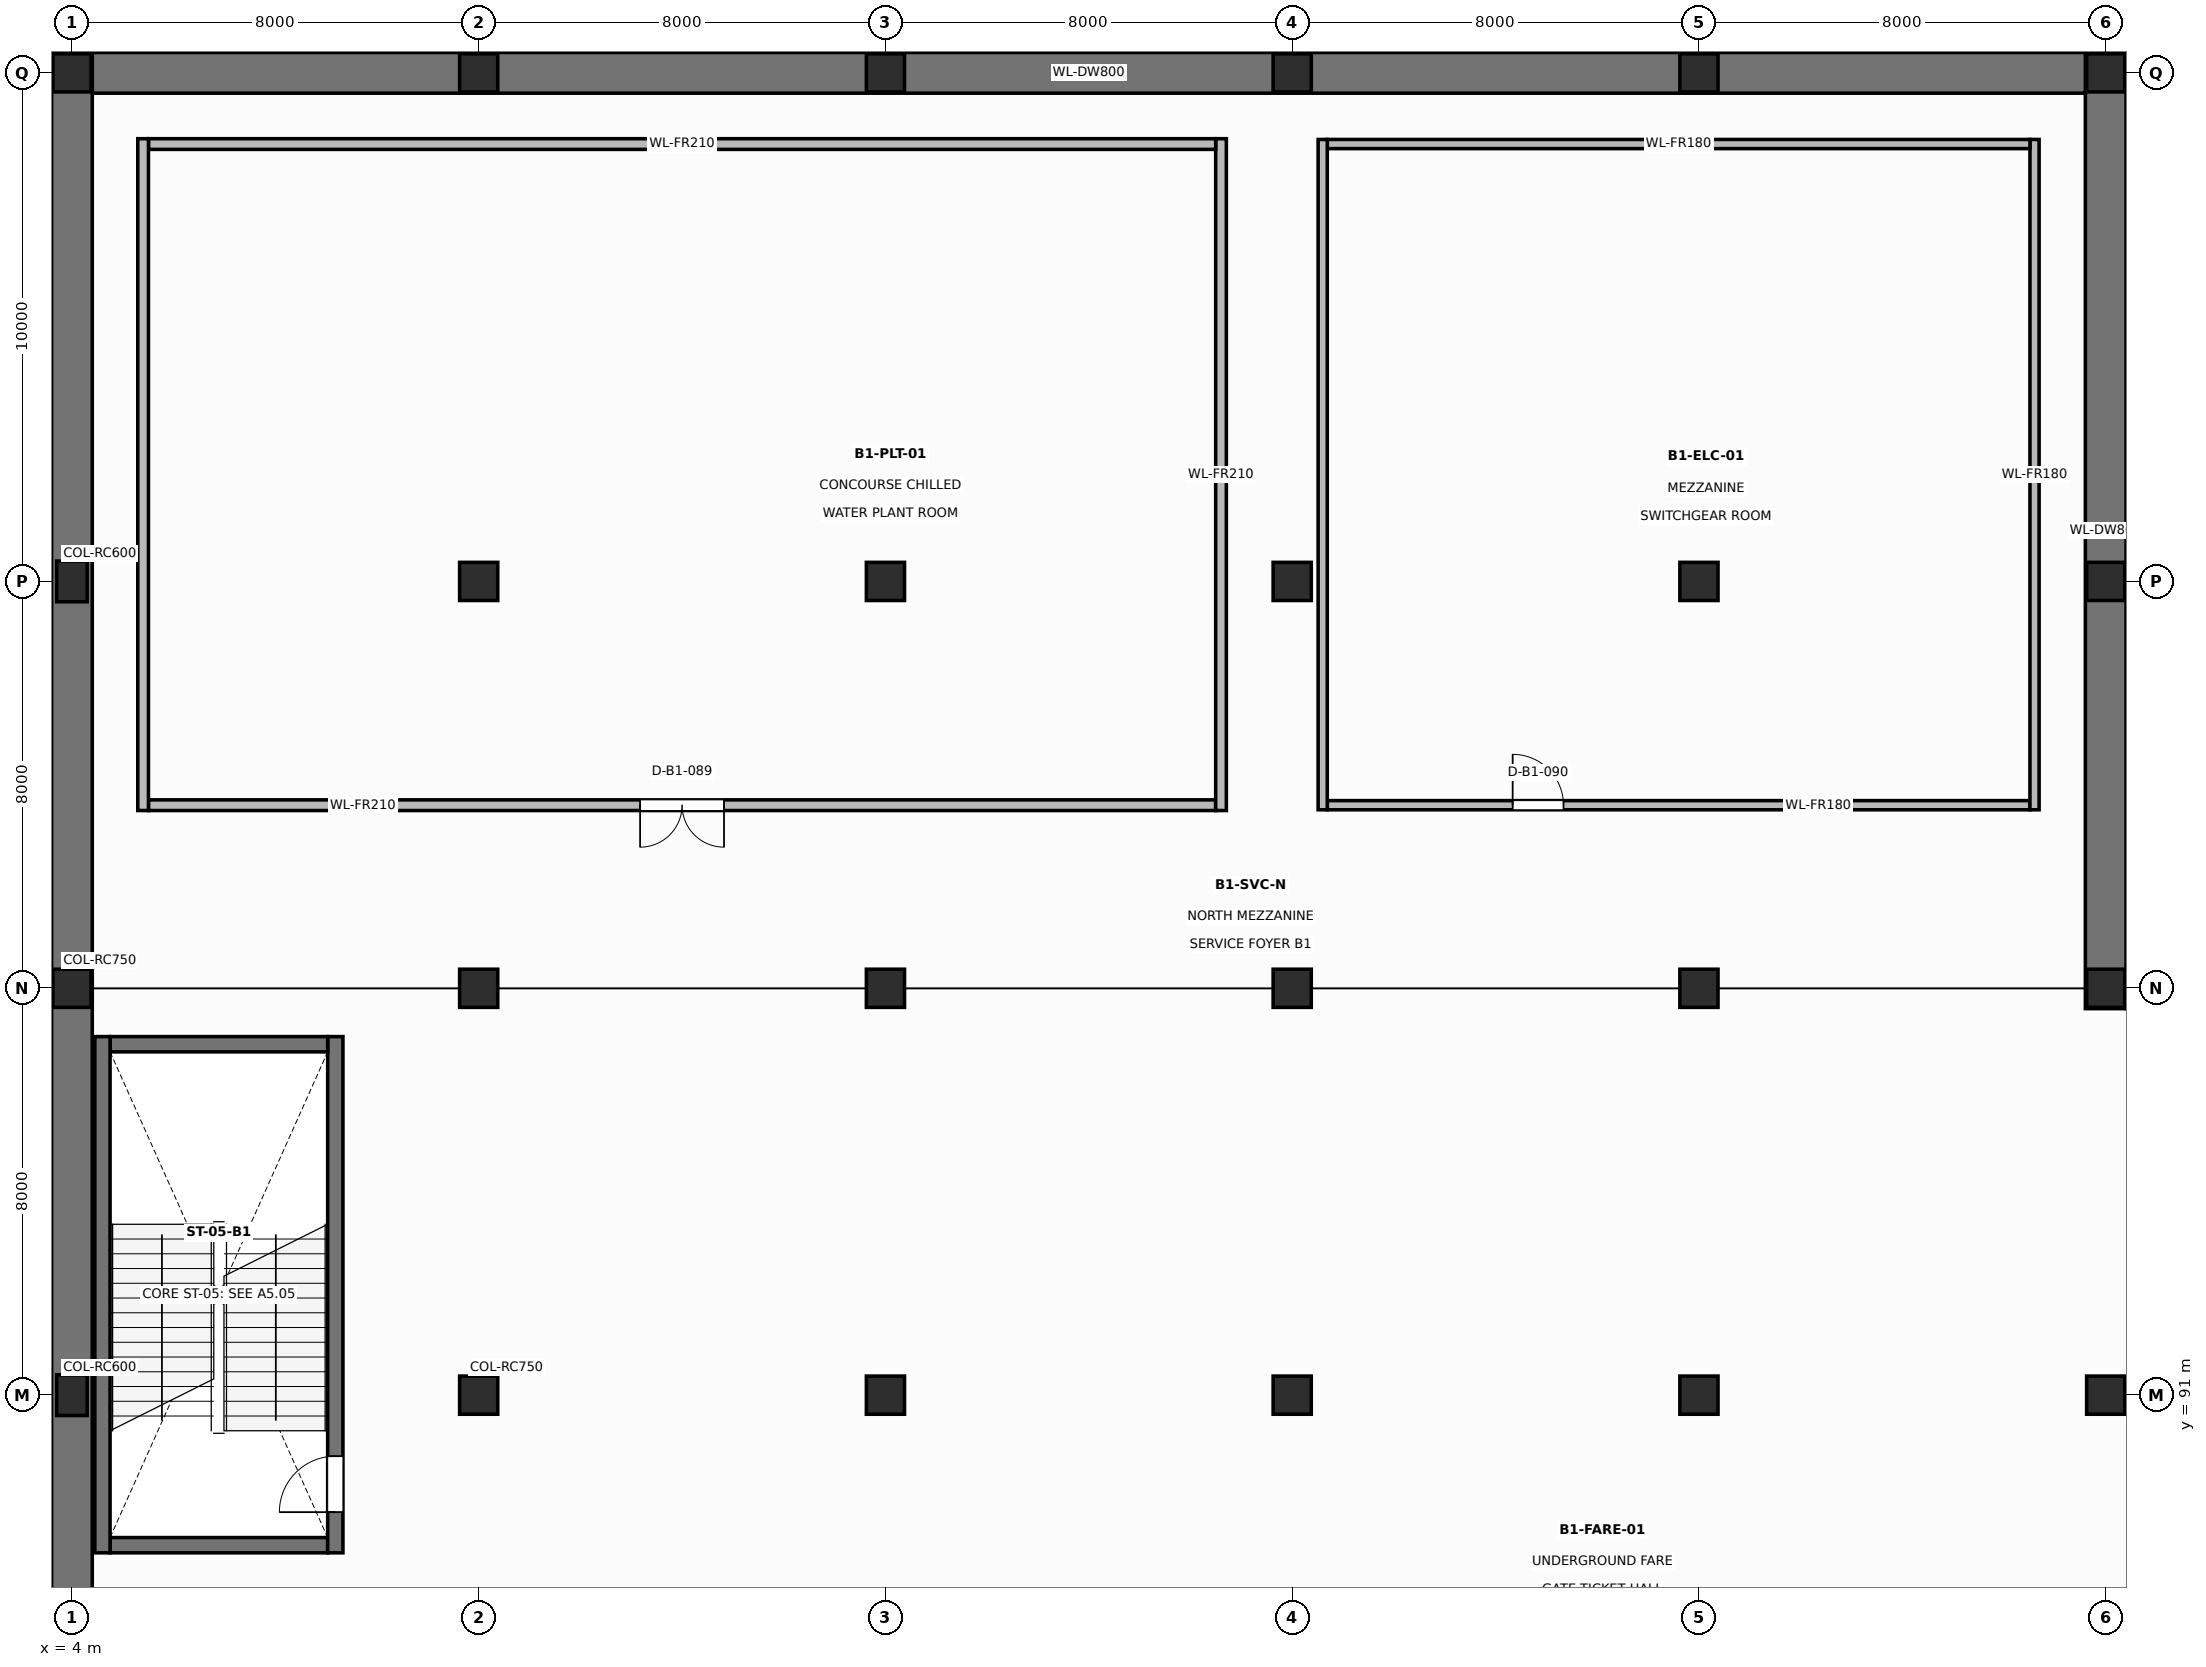
"""IFC4 building model, lengths in metres.
Left out: names, types, materials, properties, quantities, classifications, styles, units other than length and angle.
Written with IfcOpenShell. Run it as: python <this file> out.ifc"""

import sys

from ifc_helpers import new_model, si_unit, direction, frame, frame_2d, origin, origin_2d, place, context, subcontext, project, spatial, rectangle, extrude, element, fill, save


model = new_model("IFC4")
c1 = context("Model", 3, precision=1e-05, world=origin(), true_north=direction((0.0, 1.0)))
c2 = subcontext(c1, "Body", "Model", "MODEL_VIEW")
j1 = project(units=[si_unit("LENGTHUNIT", "METRE"), si_unit("PLANEANGLEUNIT", "RADIAN")], contexts=[c1])
p1 = place(None, origin())
s1 = spatial("IfcSite", under=j1, at=p1, CompositionType="ELEMENT")
p2 = place(p1, origin())
s2 = spatial("IfcBuilding", under=s1, at=p2, CompositionType="ELEMENT")
p3 = place(p2, frame((0.0, 0.0, -5.6)))
s3 = spatial("IfcBuildingStorey", under=s2, at=p3, CompositionType="ELEMENT", Elevation=-5.6)
p4 = place(p3, frame((44.0, 98.6, 0.0), z_axis=(0.0, 0.0, 1.0), x_axis=(0.0, 1.0, 0.0)))
e1 = element("IfcWall", 1, at=p4, inside=s3, PredefinedType="SOLIDWALL", context=c2, shape_type="SweptSolid", body=[
    extrude(rectangle(XDim=18.8, YDim=0.8, at=frame_2d((9.4, 0.0))), origin(), (0.0, 0.0, 1.0), 5.18),
])
p5 = place(p3, frame((4.4, 117.0, 0.0), z_axis=(0.0, 0.0, 1.0), x_axis=(1.0, 0.0, 0.0)))
e2 = element("IfcWall", 2, at=p5, inside=s3, PredefinedType="SOLIDWALL", context=c2, shape_type="SweptSolid", body=[
    extrude(rectangle(XDim=39.2, YDim=0.8, at=frame_2d((19.6, 0.0))), origin(), (0.0, 0.0, 1.0), 5.18),
])
p6 = place(p3, frame((4.0, 2.6, 0.0), z_axis=(0.0, 0.0, 1.0), x_axis=(0.0, 1.0, 0.0)))
e3 = element("IfcWall", 3, at=p6, inside=s3, PredefinedType="SOLIDWALL", context=c2, shape_type="SweptSolid", body=[
    extrude(rectangle(XDim=114.8, YDim=0.8, at=frame_2d((57.4, 0.0))), origin(), (0.0, 0.0, 1.0), 5.18),
])
p7 = place(p3, frame((4.0, 91.0, 0.0), z_axis=(0.0, 0.0, 1.0), x_axis=(1.0, 0.0, 0.0)))
e4 = element("IfcColumn", 4, at=p7, inside=s3, PredefinedType="PILASTER", context=c2, shape_type="SweptSolid", body=[
    extrude(rectangle(XDim=0.6, YDim=0.8, at=origin_2d()), origin(), (0.0, 0.0, 1.0), 5.6),
])
p8 = place(p3, frame((4.0, 99.0, 0.0), z_axis=(0.0, 0.0, 1.0), x_axis=(1.0, 0.0, 0.0)))
e5 = element("IfcColumn", 5, at=p8, inside=s3, PredefinedType="COLUMN", context=c2, shape_type="SweptSolid", body=[
    extrude(rectangle(XDim=0.75, YDim=0.75, at=origin_2d()), origin(), (0.0, 0.0, 1.0), 5.6),
])
p9 = place(p3, frame((4.0, 107.0, 0.0), z_axis=(0.0, 0.0, 1.0), x_axis=(1.0, 0.0, 0.0)))
e6 = element("IfcColumn", 6, at=p9, inside=s3, PredefinedType="PILASTER", context=c2, shape_type="SweptSolid", body=[
    extrude(rectangle(XDim=0.6, YDim=0.8, at=origin_2d()), origin(), (0.0, 0.0, 1.0), 5.6),
])
for number, where, z_axis, x_axis in (
    (7, (4.0, 117.0, 0.0), (0.0, 0.0, 1.0), (1.0, 0.0, 0.0)),
    (8, (12.0, 91.0, 0.0), (0.0, 0.0, 1.0), (1.0, 0.0, 0.0)),
    (9, (12.0, 99.0, 0.0), (0.0, 0.0, 1.0), (1.0, 0.0, 0.0)),
    (10, (12.0, 107.0, 0.0), (0.0, 0.0, 1.0), (1.0, 0.0, 0.0)),
    (11, (12.0, 117.0, 0.0), (0.0, 0.0, 1.0), (1.0, 0.0, 0.0)),
    (12, (20.0, 91.0, 0.0), (0.0, 0.0, 1.0), (1.0, 0.0, 0.0)),
    (13, (20.0, 99.0, 0.0), (0.0, 0.0, 1.0), (1.0, 0.0, 0.0)),
    (14, (20.0, 107.0, 0.0), (0.0, 0.0, 1.0), (1.0, 0.0, 0.0)),
    (15, (20.0, 117.0, 0.0), (0.0, 0.0, 1.0), (1.0, 0.0, 0.0)),
    (16, (28.0, 91.0, 0.0), (0.0, 0.0, 1.0), (1.0, 0.0, 0.0)),
    (17, (28.0, 99.0, 0.0), (0.0, 0.0, 1.0), (1.0, 0.0, 0.0)),
    (18, (28.0, 107.0, 0.0), (0.0, 0.0, 1.0), (1.0, 0.0, 0.0)),
    (19, (28.0, 117.0, 0.0), (0.0, 0.0, 1.0), (1.0, 0.0, 0.0)),
    (20, (36.0, 91.0, 0.0), (0.0, 0.0, 1.0), (1.0, 0.0, 0.0)),
    (21, (36.0, 99.0, 0.0), (0.0, 0.0, 1.0), (1.0, 0.0, 0.0)),
    (22, (36.0, 107.0, 0.0), (0.0, 0.0, 1.0), (1.0, 0.0, 0.0)),
    (23, (36.0, 117.0, 0.0), (0.0, 0.0, 1.0), (1.0, 0.0, 0.0)),
    (24, (44.0, 91.0, 0.0), (0.0, 0.0, 1.0), (1.0, 0.0, 0.0)),
    (25, (44.0, 99.0, 0.0), (0.0, 0.0, 1.0), (1.0, 0.0, 0.0)),
    (26, (44.0, 107.0, 0.0), (0.0, 0.0, 1.0), (1.0, 0.0, 0.0)),
    (27, (44.0, 117.0, 0.0), (0.0, 0.0, 1.0), (1.0, 0.0, 0.0)),
):
    element("IfcColumn", number, at=place(p3, frame(where, z_axis=z_axis, x_axis=x_axis)), inside=s3, PredefinedType="COLUMN", context=c2, shape_type="SweptSolid", body=[
        extrude(rectangle(XDim=0.75, YDim=0.75, at=origin_2d()), origin(), (0.0, 0.0, 1.0), 5.6),
    ])
p10 = place(p3, frame((4.75, 88.05, 0.0), z_axis=(0.0, 0.0, 1.0), x_axis=(1.0, 0.0, 0.0)))
e28 = element("IfcWall", 28, at=p10, inside=s3, PredefinedType="SHEAR", context=c2, shape_type="SweptSolid", body=[
    extrude(rectangle(XDim=4.28, YDim=0.3, at=frame_2d((2.14, 0.0))), origin(), (0.0, 0.0, 1.0), 5.275),
])
p11 = place(p3, frame((9.18, 87.9, 0.0), z_axis=(0.0, 0.0, 1.0), x_axis=(0.0, 1.0, 0.0)))
e29 = element("IfcWall", 29, at=p11, inside=s3, PredefinedType="SHEAR", context=c2, shape_type="SweptSolid", body=[
    extrude(rectangle(XDim=10.15, YDim=0.3, at=frame_2d((5.075, 0.0))), origin(), (0.0, 0.0, 1.0), 5.275),
])
p12 = place(p11, frame((0.8, 0.0, 0.0)))
e30 = element("IfcOpeningElement", 30, at=p12, cuts=e29, PredefinedType="OPENING", context=c2, shape_type="SweptSolid", body=[
    extrude(rectangle(XDim=1.1, YDim=2.15, at=frame_2d((0.55, 1.075))), frame((0.0, 0.16, 0.0), z_axis=(0.0, -1.0, 0.0), x_axis=(1.0, 0.0, 0.0)), (0.0, 0.0, 1.0), 0.32),
])
p13 = place(p3, frame((9.03, 97.9, 0.0), z_axis=(0.0, 0.0, 1.0), x_axis=(-1.0, 0.0, 0.0)))
e31 = element("IfcWall", 31, at=p13, inside=s3, PredefinedType="SHEAR", context=c2, shape_type="SweptSolid", body=[
    extrude(rectangle(XDim=4.28, YDim=0.3, at=frame_2d((2.14, 0.0))), origin(), (0.0, 0.0, 1.0), 5.275),
])
p14 = place(p3, frame((4.6, 98.05, 0.0), z_axis=(0.0, 0.0, 1.0), x_axis=(0.0, -1.0, 0.0)))
e32 = element("IfcWall", 32, at=p14, inside=s3, PredefinedType="SHEAR", context=c2, shape_type="SweptSolid", body=[
    extrude(rectangle(XDim=10.15, YDim=0.3, at=frame_2d((5.075, 0.0))), origin(), (0.0, 0.0, 1.0), 5.275),
])
p15 = place(p3, frame((5.505, 102.6, 0.0), z_axis=(0.0, 0.0, 1.0), x_axis=(1.0, 0.0, 0.0)))
e33 = element("IfcWall", 33, at=p15, inside=s3, PredefinedType="SOLIDWALL", context=c2, shape_type="SweptSolid", body=[
    extrude(rectangle(XDim=20.99, YDim=0.21, at=frame_2d((10.495, 0.0))), origin(), (0.0, 0.0, 1.0), 4.475),
])
p16 = place(p15, frame((9.67, 0.0, 0.0)))
e34 = element("IfcOpeningElement", 34, at=p16, cuts=e33, PredefinedType="OPENING", context=c2, shape_type="SweptSolid", body=[
    extrude(rectangle(XDim=1.65, YDim=2.2, at=frame_2d((0.825, 1.1))), frame((0.0, 0.115, 0.0), z_axis=(0.0, -1.0, 0.0), x_axis=(1.0, 0.0, 0.0)), (0.0, 0.0, 1.0), 0.23),
])
p17 = place(p3, frame((26.6, 102.495, 0.0), z_axis=(0.0, 0.0, 1.0), x_axis=(0.0, 1.0, 0.0)))
e35 = element("IfcWall", 35, at=p17, inside=s3, PredefinedType="SOLIDWALL", context=c2, shape_type="SweptSolid", body=[
    extrude(rectangle(XDim=13.21, YDim=0.21, at=frame_2d((6.605, 0.0))), origin(), (0.0, 0.0, 1.0), 4.475),
])
p18 = place(p3, frame((26.495, 115.6, 0.0), z_axis=(0.0, 0.0, 1.0), x_axis=(-1.0, 0.0, 0.0)))
e36 = element("IfcWall", 36, at=p18, inside=s3, PredefinedType="SOLIDWALL", context=c2, shape_type="SweptSolid", body=[
    extrude(rectangle(XDim=20.99, YDim=0.21, at=frame_2d((10.495, 0.0))), origin(), (0.0, 0.0, 1.0), 4.475),
])
p19 = place(p3, frame((5.4, 115.705, 0.0), z_axis=(0.0, 0.0, 1.0), x_axis=(0.0, -1.0, 0.0)))
e37 = element("IfcWall", 37, at=p19, inside=s3, PredefinedType="SOLIDWALL", context=c2, shape_type="SweptSolid", body=[
    extrude(rectangle(XDim=13.21, YDim=0.21, at=frame_2d((6.605, 0.0))), origin(), (0.0, 0.0, 1.0), 4.475),
])
p20 = place(p3, frame((28.69, 102.6, 0.0), z_axis=(0.0, 0.0, 1.0), x_axis=(1.0, 0.0, 0.0)))
e38 = element("IfcWall", 38, at=p20, inside=s3, PredefinedType="PARTITIONING", context=c2, shape_type="SweptSolid", body=[
    extrude(rectangle(XDim=13.82, YDim=0.18, at=frame_2d((6.91, 0.0))), origin(), (0.0, 0.0, 1.0), 4.475),
])
p21 = place(p20, frame((3.646, 0.0, 0.0)))
e39 = element("IfcOpeningElement", 39, at=p21, cuts=e38, PredefinedType="OPENING", context=c2, shape_type="SweptSolid", body=[
    extrude(rectangle(XDim=1.0, YDim=2.14, at=frame_2d((0.5, 1.07))), frame((0.0, 0.1, 0.0), z_axis=(0.0, -1.0, 0.0), x_axis=(1.0, 0.0, 0.0)), (0.0, 0.0, 1.0), 0.2),
])
p22 = place(p3, frame((42.6, 102.51, 0.0), z_axis=(0.0, 0.0, 1.0), x_axis=(0.0, 1.0, 0.0)))
e40 = element("IfcWall", 40, at=p22, inside=s3, PredefinedType="PARTITIONING", context=c2, shape_type="SweptSolid", body=[
    extrude(rectangle(XDim=13.18, YDim=0.18, at=frame_2d((6.59, 0.0))), origin(), (0.0, 0.0, 1.0), 4.475),
])
p23 = place(p3, frame((42.51, 115.6, 0.0), z_axis=(0.0, 0.0, 1.0), x_axis=(-1.0, 0.0, 0.0)))
e41 = element("IfcWall", 41, at=p23, inside=s3, PredefinedType="PARTITIONING", context=c2, shape_type="SweptSolid", body=[
    extrude(rectangle(XDim=13.82, YDim=0.18, at=frame_2d((6.91, 0.0))), origin(), (0.0, 0.0, 1.0), 4.475),
])
p24 = place(p3, frame((28.6, 115.69, 0.0), z_axis=(0.0, 0.0, 1.0), x_axis=(0.0, -1.0, 0.0)))
e42 = element("IfcWall", 42, at=p24, inside=s3, PredefinedType="PARTITIONING", context=c2, shape_type="SweptSolid", body=[
    extrude(rectangle(XDim=13.18, YDim=0.18, at=frame_2d((6.59, 0.0))), origin(), (0.0, 0.0, 1.0), 4.475),
])
p25 = place(p12, origin())
e43 = element("IfcDoor", 43, at=p25, inside=s3, OperationType="SINGLE_SWING_LEFT", PredefinedType="DOOR", context=c2, shape_type="SweptSolid", body=[
    extrude(rectangle(XDim=1.1, YDim=2.15, at=frame_2d((0.55, 1.075))), frame((0.0, 0.025, 0.0), z_axis=(0.0, -1.0, 0.0), x_axis=(1.0, 0.0, 0.0)), (0.0, 0.0, 1.0), 0.05),
])
fill(e30, e43)
p26 = place(p16, frame((1.65, 0.0, 0.0), z_axis=(0.0, 0.0, 1.0), x_axis=(-1.0, 0.0, 0.0)))
e44 = element("IfcDoor", 44, at=p26, inside=s3, OperationType="DOUBLE_DOOR_SINGLE_SWING", PredefinedType="DOOR", context=c2, shape_type="SweptSolid", body=[
    extrude(rectangle(XDim=1.65, YDim=2.2, at=frame_2d((0.825, 1.1))), frame((0.0, 0.025, 0.0), z_axis=(0.0, -1.0, 0.0), x_axis=(1.0, 0.0, 0.0)), (0.0, 0.0, 1.0), 0.05),
])
fill(e34, e44)
p27 = place(p21, origin())
e45 = element("IfcDoor", 45, at=p27, inside=s3, OperationType="SINGLE_SWING_LEFT", PredefinedType="DOOR", context=c2, shape_type="SweptSolid", body=[
    extrude(rectangle(XDim=1.0, YDim=2.14, at=frame_2d((0.5, 1.07))), frame((0.0, 0.025, 0.0), z_axis=(0.0, -1.0, 0.0), x_axis=(1.0, 0.0, 0.0)), (0.0, 0.0, 1.0), 0.05),
])
fill(e39, e45)
save(model, sys.argv[1])
